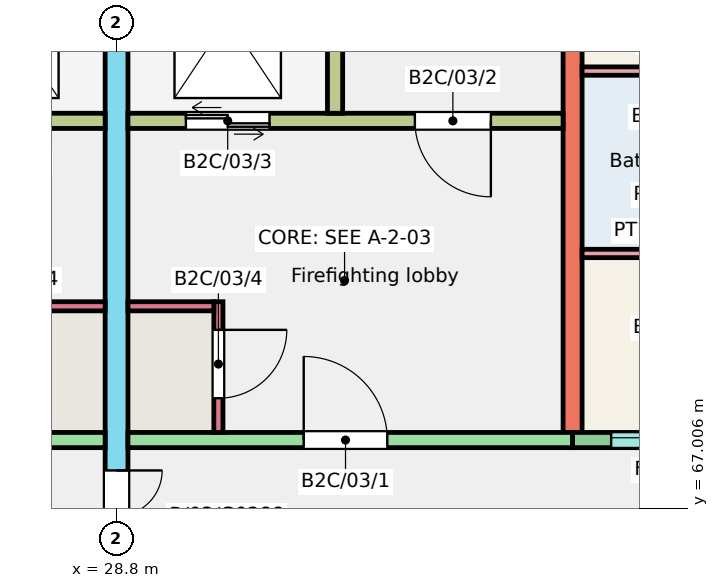
"""IFC4 building model, lengths in metres.
Left out: names, types, materials, properties, quantities, classifications, styles, units other than length and angle.
Written with IfcOpenShell. Run it as: python <this file> out.ifc"""

import sys

from ifc_helpers import new_model, si_unit, direction, frame, frame_2d, origin, place, context, subcontext, project, spatial, rectangle, extrude, element, fill, save


model = new_model("IFC4")
c1 = context("Model", 3, precision=1e-05, world=origin(), true_north=direction((0.0, 1.0)))
c2 = subcontext(c1, "Body", "Model", "MODEL_VIEW")
j1 = project(units=[si_unit("LENGTHUNIT", "METRE"), si_unit("PLANEANGLEUNIT", "RADIAN")], contexts=[c1])
p1 = place(None, origin())
s1 = spatial("IfcSite", under=j1, at=p1, CompositionType="ELEMENT")
p2 = place(p1, origin())
s2 = spatial("IfcBuilding", under=s1, at=p2, CompositionType="ELEMENT")
p3 = place(p2, frame((0.0, 0.0, 9.0)))
s3 = spatial("IfcBuildingStorey", under=s2, at=p3, CompositionType="ELEMENT", Elevation=9.0)
p4 = place(p3, frame((28.8, 66.0, 0.0), z_axis=(0.0, 0.0, 1.0), x_axis=(0.0, 1.0, 0.0)))
e1 = element("IfcWall", 1, at=p4, inside=s3, PredefinedType="SHEAR", context=c2, shape_type="SweptSolid", body=[
    extrude(rectangle(XDim=11.0, YDim=0.3, at=frame_2d((5.5, 0.0))), origin(), (0.0, 0.0, 1.0), 3.0),
])
p5 = place(p4, frame((0.3, 0.0, 0.0)))
e2 = element("IfcOpeningElement", 2, at=p5, cuts=e1, PredefinedType="OPENING", context=c2, shape_type="SweptSolid", body=[
    extrude(rectangle(XDim=1.2, YDim=2.1, at=frame_2d((0.6, 1.05))), frame((0.0, 0.16, 0.0), z_axis=(0.0, -1.0, 0.0), x_axis=(1.0, 0.0, 0.0)), (0.0, 0.0, 1.0), 0.32),
])
p6 = place(p3, frame((34.8, 68.0, 0.0), z_axis=(0.0, 0.0, 1.0), x_axis=(0.0, 1.0, 0.0)))
e3 = element("IfcWall", 3, at=p6, inside=s3, PredefinedType="SHEAR", context=c2, shape_type="SweptSolid", body=[
    extrude(rectangle(XDim=9.0, YDim=0.25, at=frame_2d((4.5, 0.0))), origin(), (0.0, 0.0, 1.0), 3.0),
])
p7 = place(p3, frame((22.8, 67.9, 0.0), z_axis=(0.0, 0.0, 1.0), x_axis=(1.0, 0.0, 0.0)))
e4 = element("IfcWall", 4, at=p7, inside=s3, PredefinedType="SHEAR", context=c2, shape_type="SweptSolid", body=[
    extrude(rectangle(XDim=5.85, YDim=0.2, at=frame_2d((2.925, 0.0))), origin(), (0.0, 0.0, 1.0), 3.0),
])
p8 = place(p7, frame((2.438, 0.0, 0.0)))
e5 = element("IfcOpeningElement", 5, at=p8, cuts=e4, PredefinedType="OPENING", context=c2, shape_type="SweptSolid", body=[
    extrude(rectangle(XDim=1.1, YDim=2.1, at=frame_2d((0.55, 1.05))), frame((0.0, 0.11, 0.0), z_axis=(0.0, -1.0, 0.0), x_axis=(1.0, 0.0, 0.0)), (0.0, 0.0, 1.0), 0.22),
])
p9 = place(p3, frame((22.925, 72.1, 0.0), z_axis=(0.0, 0.0, 1.0), x_axis=(1.0, 0.0, 0.0)))
e6 = element("IfcWall", 6, at=p9, inside=s3, PredefinedType="SHEAR", context=c2, shape_type="SweptSolid", body=[
    extrude(rectangle(XDim=5.725, YDim=0.2, at=frame_2d((2.862, 0.0))), origin(), (0.0, 0.0, 1.0), 3.0),
])
p10 = place(p9, frame((0.95, 0.0, 0.0)))
e7 = element("IfcOpeningElement", 7, at=p10, cuts=e6, PredefinedType="OPENING", context=c2, shape_type="SweptSolid", body=[
    extrude(rectangle(XDim=1.0, YDim=2.1, at=frame_2d((0.5, 1.05))), frame((0.0, 0.11, 0.0), z_axis=(0.0, -1.0, 0.0), x_axis=(1.0, 0.0, 0.0)), (0.0, 0.0, 1.0), 0.22),
])
p11 = place(p9, frame((3.863, 0.0, 0.0)))
e8 = element("IfcOpeningElement", 8, at=p11, cuts=e6, PredefinedType="OPENING", context=c2, shape_type="SweptSolid", body=[
    extrude(rectangle(XDim=1.1, YDim=2.1, at=frame_2d((0.55, 1.05))), frame((0.0, 0.11, 0.0), z_axis=(0.0, -1.0, 0.0), x_axis=(1.0, 0.0, 0.0)), (0.0, 0.0, 1.0), 0.22),
])
p12 = place(p3, frame((27.52, 69.66, 0.0), z_axis=(0.0, 0.0, 1.0), x_axis=(1.0, 0.0, 0.0)))
e9 = element("IfcWall", 9, at=p12, inside=s3, PredefinedType="SHEAR", context=c2, shape_type="SweptSolid", body=[
    extrude(rectangle(XDim=1.13, YDim=0.12, at=frame_2d((0.565, 0.0))), origin(), (0.0, 0.0, 1.0), 3.0),
])
p13 = place(p3, frame((28.95, 67.9, 0.0), z_axis=(0.0, 0.0, 1.0), x_axis=(1.0, 0.0, 0.0)))
e10 = element("IfcWall", 10, at=p13, inside=s3, PredefinedType="SHEAR", context=c2, shape_type="SweptSolid", body=[
    extrude(rectangle(XDim=5.85, YDim=0.2, at=frame_2d((2.925, 0.0))), origin(), (0.0, 0.0, 1.0), 3.0),
])
p14 = place(p13, frame((2.312, 0.0, 0.0)))
e11 = element("IfcOpeningElement", 11, at=p14, cuts=e10, PredefinedType="OPENING", context=c2, shape_type="SweptSolid", body=[
    extrude(rectangle(XDim=1.1, YDim=2.1, at=frame_2d((0.55, 1.05))), frame((0.0, 0.11, 0.0), z_axis=(0.0, -1.0, 0.0), x_axis=(1.0, 0.0, 0.0)), (0.0, 0.0, 1.0), 0.22),
])
p15 = place(p3, frame((28.95, 72.1, 0.0), z_axis=(0.0, 0.0, 1.0), x_axis=(1.0, 0.0, 0.0)))
e12 = element("IfcWall", 12, at=p15, inside=s3, PredefinedType="SHEAR", context=c2, shape_type="SweptSolid", body=[
    extrude(rectangle(XDim=5.725, YDim=0.2, at=frame_2d((2.863, 0.0))), origin(), (0.0, 0.0, 1.0), 3.0),
])
p16 = place(p15, frame((3.775, 0.0, 0.0)))
e13 = element("IfcOpeningElement", 13, at=p16, cuts=e12, PredefinedType="OPENING", context=c2, shape_type="SweptSolid", body=[
    extrude(rectangle(XDim=1.0, YDim=2.1, at=frame_2d((0.5, 1.05))), frame((0.0, 0.11, 0.0), z_axis=(0.0, -1.0, 0.0), x_axis=(1.0, 0.0, 0.0)), (0.0, 0.0, 1.0), 0.22),
])
p17 = place(p15, frame((0.762, 0.0, 0.0)))
e14 = element("IfcOpeningElement", 14, at=p17, cuts=e12, PredefinedType="OPENING", context=c2, shape_type="SweptSolid", body=[
    extrude(rectangle(XDim=1.1, YDim=2.1, at=frame_2d((0.55, 1.05))), frame((0.0, 0.11, 0.0), z_axis=(0.0, -1.0, 0.0), x_axis=(1.0, 0.0, 0.0)), (0.0, 0.0, 1.0), 0.22),
])
p18 = place(p3, frame((31.675, 72.2, 0.0), z_axis=(0.0, 0.0, 1.0), x_axis=(0.0, 1.0, 0.0)))
e15 = element("IfcWall", 15, at=p18, inside=s3, PredefinedType="SHEAR", context=c2, shape_type="SweptSolid", body=[
    extrude(rectangle(XDim=4.8, YDim=0.2, at=frame_2d((2.4, 0.0))), origin(), (0.0, 0.0, 1.0), 3.0),
])
p19 = place(p3, frame((30.14, 68.0, 0.0), z_axis=(0.0, 0.0, 1.0), x_axis=(0.0, 1.0, 0.0)))
e16 = element("IfcWall", 16, at=p19, inside=s3, PredefinedType="SHEAR", context=c2, shape_type="SweptSolid", body=[
    extrude(rectangle(XDim=1.72, YDim=0.12, at=frame_2d((0.86, 0.0))), origin(), (0.0, 0.0, 1.0), 3.0),
])
p20 = place(p19, frame((0.45, 0.0, 0.0)))
e17 = element("IfcOpeningElement", 17, at=p20, cuts=e16, PredefinedType="OPENING", context=c2, shape_type="SweptSolid", body=[
    extrude(rectangle(XDim=0.9, YDim=2.1, at=frame_2d((0.45, 1.05))), frame((0.0, 0.07, 0.0), z_axis=(0.0, -1.0, 0.0), x_axis=(1.0, 0.0, 0.0)), (0.0, 0.0, 1.0), 0.14),
])
p21 = place(p3, frame((28.95, 69.66, 0.0), z_axis=(0.0, 0.0, 1.0), x_axis=(1.0, 0.0, 0.0)))
e18 = element("IfcWall", 18, at=p21, inside=s3, PredefinedType="SHEAR", context=c2, shape_type="SweptSolid", body=[
    extrude(rectangle(XDim=1.13, YDim=0.12, at=frame_2d((0.565, 0.0))), origin(), (0.0, 0.0, 1.0), 3.0),
])
p22 = place(p3, frame((34.8, 67.9, 0.0), z_axis=(0.0, 0.0, 1.0), x_axis=(1.0, 0.0, 0.0)))
e19 = element("IfcWall", 19, at=p22, inside=s3, PredefinedType="SOLIDWALL", context=c2, shape_type="SweptSolid", body=[
    extrude(rectangle(XDim=3.6, YDim=0.2, at=frame_2d((1.8, 0.0))), origin(), (0.0, 0.0, 1.0), 3.0),
])
p23 = place(p22, frame((0.508, 0.0, 1.1)))
e20 = element("IfcOpeningElement", 20, at=p23, cuts=e19, PredefinedType="OPENING", context=c2, shape_type="SweptSolid", body=[
    extrude(rectangle(XDim=1.2, YDim=1.3, at=frame_2d((0.6, 0.65))), frame((0.0, 0.11, 0.0), z_axis=(0.0, -1.0, 0.0), x_axis=(1.0, 0.0, 0.0)), (0.0, 0.0, 1.0), 0.22),
])
p24 = place(p22, frame((2.35, 0.0, 0.0)))
e21 = element("IfcOpeningElement", 21, at=p24, cuts=e19, PredefinedType="OPENING", context=c2, shape_type="SweptSolid", body=[
    extrude(rectangle(XDim=1.0, YDim=2.1, at=frame_2d((0.5, 1.05))), frame((0.0, 0.11, 0.0), z_axis=(0.0, -1.0, 0.0), x_axis=(1.0, 0.0, 0.0)), (0.0, 0.0, 1.0), 0.22),
])
p25 = place(p3, frame((34.925, 70.355, 0.0), z_axis=(0.0, 0.0, 1.0), x_axis=(1.0, 0.0, 0.0)))
e22 = element("IfcWall", 22, at=p25, inside=s3, PredefinedType="PARTITIONING", context=c2, shape_type="SweptSolid", body=[
    extrude(rectangle(XDim=1.965, YDim=0.11, at=frame_2d((0.982, 0.0))), origin(), (0.0, 0.0, 1.0), 2.8),
])
p26 = place(p3, frame((34.925, 72.755, 0.0), z_axis=(0.0, 0.0, 1.0), x_axis=(1.0, 0.0, 0.0)))
e23 = element("IfcWall", 23, at=p26, inside=s3, PredefinedType="PARTITIONING", context=c2, shape_type="SweptSolid", body=[
    extrude(rectangle(XDim=3.375, YDim=0.11, at=frame_2d((1.688, 0.0))), origin(), (0.0, 0.0, 1.0), 2.8),
])
p27 = place(p26, frame((2.275, 0.0, 0.0)))
e24 = element("IfcOpeningElement", 24, at=p27, cuts=e23, PredefinedType="OPENING", context=c2, shape_type="SweptSolid", body=[
    extrude(rectangle(XDim=0.9, YDim=2.1, at=frame_2d((0.45, 1.05))), frame((0.0, 0.065, 0.0), z_axis=(0.0, -1.0, 0.0), x_axis=(1.0, 0.0, 0.0)), (0.0, 0.0, 1.0), 0.13),
])
p28 = place(p23, origin())
e25 = element("IfcWindow", 25, at=p28, inside=s3, PartitioningType="SINGLE_PANEL", PredefinedType="WINDOW", context=c2, shape_type="SweptSolid", body=[
    extrude(rectangle(XDim=1.2, YDim=1.3, at=frame_2d((0.6, 0.65))), frame((0.0, 0.06, 0.0), z_axis=(0.0, -1.0, 0.0), x_axis=(1.0, 0.0, 0.0)), (0.0, 0.0, 1.0), 0.06),
])
fill(e20, e25)
p29 = place(p14, origin())
e26 = element("IfcDoor", 26, at=p29, inside=s3, OperationType="SINGLE_SWING_LEFT", PredefinedType="DOOR", context=c2, shape_type="SweptSolid", body=[
    extrude(rectangle(XDim=1.1, YDim=2.1, at=frame_2d((0.55, 1.05))), frame((0.0, 0.025, 0.0), z_axis=(0.0, -1.0, 0.0), x_axis=(1.0, 0.0, 0.0)), (0.0, 0.0, 1.0), 0.05),
])
fill(e11, e26)
p30 = place(p16, origin())
e27 = element("IfcDoor", 27, at=p30, inside=s3, OperationType="SINGLE_SWING_RIGHT", PredefinedType="DOOR", context=c2, shape_type="SweptSolid", body=[
    extrude(rectangle(XDim=1.0, YDim=2.1, at=frame_2d((0.5, 1.05))), frame((0.0, 0.025, 0.0), z_axis=(0.0, -1.0, 0.0), x_axis=(1.0, 0.0, 0.0)), (0.0, 0.0, 1.0), 0.05),
])
fill(e13, e27)
p31 = place(p17, origin())
e28 = element("IfcDoor", 28, at=p31, inside=s3, OperationType="DOUBLE_DOOR_SLIDING", PredefinedType="DOOR", context=c2, shape_type="SweptSolid", body=[
    extrude(rectangle(XDim=1.1, YDim=2.1, at=frame_2d((0.55, 1.05))), frame((0.0, 0.025, 0.0), z_axis=(0.0, -1.0, 0.0), x_axis=(1.0, 0.0, 0.0)), (0.0, 0.0, 1.0), 0.05),
])
fill(e14, e28)
p32 = place(p20, origin())
e29 = element("IfcDoor", 29, at=p32, inside=s3, OperationType="SINGLE_SWING_RIGHT", PredefinedType="DOOR", context=c2, shape_type="SweptSolid", body=[
    extrude(rectangle(XDim=0.9, YDim=2.1, at=frame_2d((0.45, 1.05))), frame((0.0, 0.025, 0.0), z_axis=(0.0, -1.0, 0.0), x_axis=(1.0, 0.0, 0.0)), (0.0, 0.0, 1.0), 0.05),
])
fill(e17, e29)
p33 = place(p5, origin())
e30 = element("IfcDoor", 30, at=p33, inside=s3, OperationType="DOUBLE_DOOR_SINGLE_SWING", PredefinedType="DOOR", context=c2, shape_type="SweptSolid", body=[
    extrude(rectangle(XDim=1.2, YDim=2.1, at=frame_2d((0.6, 1.05))), frame((0.0, 0.025, 0.0), z_axis=(0.0, -1.0, 0.0), x_axis=(1.0, 0.0, 0.0)), (0.0, 0.0, 1.0), 0.05),
])
fill(e2, e30)
save(model, sys.argv[1])
